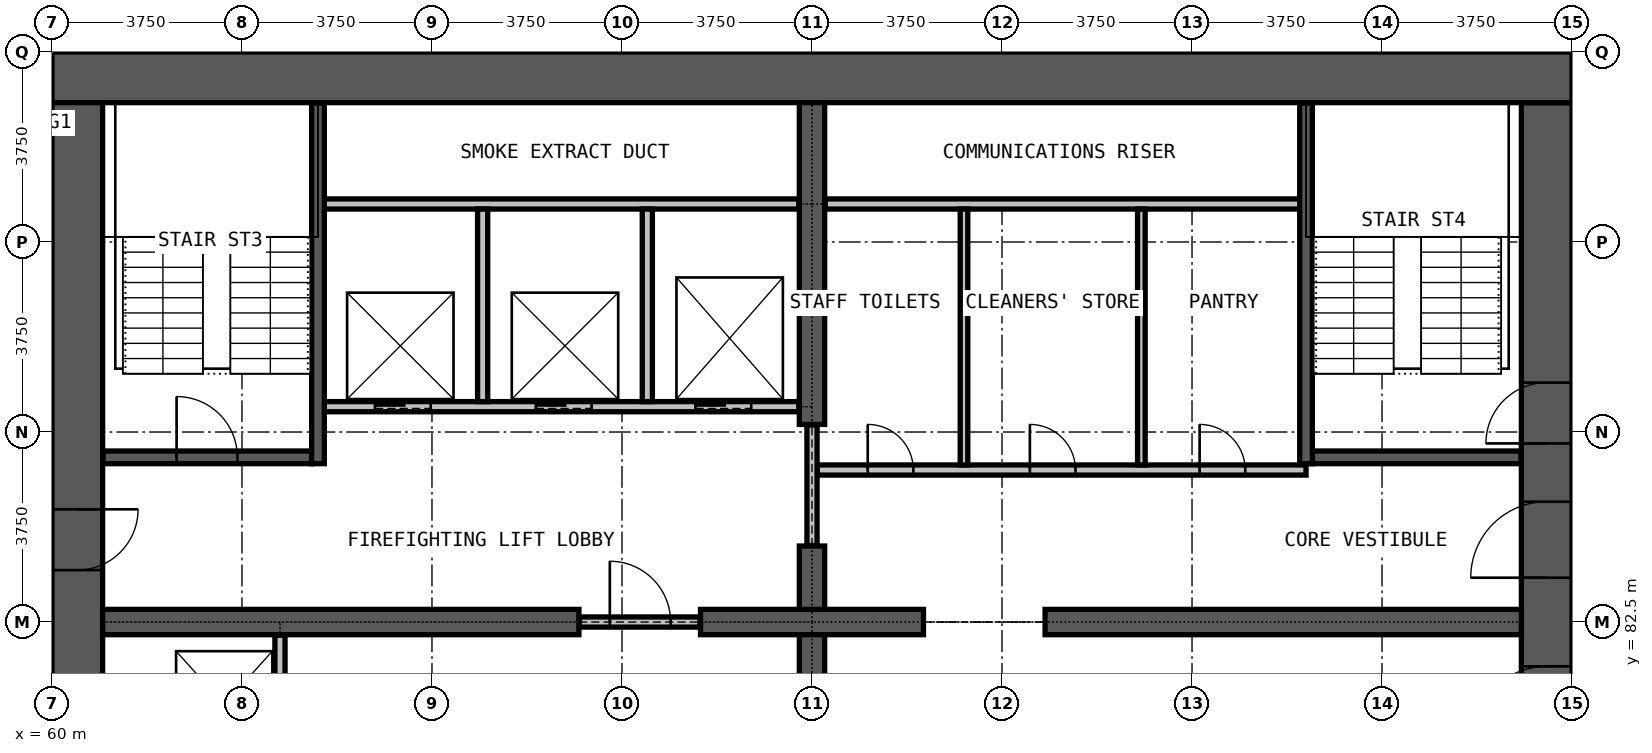
"""IFC4 building model, lengths in metres.
Left out: names, types, materials, properties, quantities, classifications, styles, units other than length and angle.
Written with IfcOpenShell. Run it as: python <this file> out.ifc"""

import sys

from ifc_helpers import new_model, si_unit, direction, frame, frame_2d, origin, place, context, subcontext, project, spatial, rectangle, extrude, element, fill, save


model = new_model("IFC4")
c1 = context("Model", 3, precision=1e-05, world=origin(), true_north=direction((0.0, 1.0)))
c2 = subcontext(c1, "Body", "Model", "MODEL_VIEW")
j1 = project(units=[si_unit("LENGTHUNIT", "METRE"), si_unit("PLANEANGLEUNIT", "RADIAN")], contexts=[c1])
p1 = place(None, origin())
s1 = spatial("IfcSite", under=j1, at=p1, CompositionType="ELEMENT")
p2 = place(p1, origin())
s2 = spatial("IfcBuilding", under=s1, at=p2, CompositionType="ELEMENT")
p3 = place(p2, frame((0.0, 0.0, 56.0)))
s3 = spatial("IfcBuildingStorey", under=s2, at=p3, CompositionType="ELEMENT", Elevation=56.0)
p4 = place(p3, frame((89.5, 72.25, 0.0), z_axis=(0.0, 0.0, 1.0), x_axis=(0.0, 1.0, 0.0)))
e1 = element("IfcWall", 1, at=p4, inside=s3, PredefinedType="SHEAR", context=c2, shape_type="SweptSolid", body=[
    extrude(rectangle(XDim=20.5, YDim=1.0, at=frame_2d((10.25, 0.0))), origin(), (0.0, 0.0, 1.0), 3.3),
])
p5 = place(p4, frame((0.275, 0.0, 0.0)))
e2 = element("IfcOpeningElement", 2, at=p5, cuts=e1, PredefinedType="OPENING", context=c2, shape_type="SweptSolid", body=[
    extrude(rectangle(XDim=1.2, YDim=2.2, at=frame_2d((0.6, 1.1))), frame((0.0, 0.51, 0.0), z_axis=(0.0, -1.0, 0.0), x_axis=(1.0, 0.0, 0.0)), (0.0, 0.0, 1.0), 1.02),
])
p6 = place(p4, frame((13.775, 0.0, 0.0)))
e3 = element("IfcOpeningElement", 3, at=p6, cuts=e1, PredefinedType="OPENING", context=c2, shape_type="SweptSolid", body=[
    extrude(rectangle(XDim=1.2, YDim=2.2, at=frame_2d((0.6, 1.1))), frame((0.0, 0.51, 0.0), z_axis=(0.0, -1.0, 0.0), x_axis=(1.0, 0.0, 0.0)), (0.0, 0.0, 1.0), 1.02),
])
p7 = place(p4, frame((7.875, 0.0, 0.0)))
e4 = element("IfcOpeningElement", 4, at=p7, cuts=e1, PredefinedType="OPENING", context=c2, shape_type="SweptSolid", body=[
    extrude(rectangle(XDim=1.5, YDim=2.2, at=frame_2d((0.75, 1.1))), frame((0.0, 0.51, 0.0), z_axis=(0.0, -1.0, 0.0), x_axis=(1.0, 0.0, 0.0)), (0.0, 0.0, 1.0), 1.02),
])
p8 = place(p4, frame((11.125, 0.0, 0.0)))
e5 = element("IfcOpeningElement", 5, at=p8, cuts=e1, PredefinedType="OPENING", context=c2, shape_type="SweptSolid", body=[
    extrude(rectangle(XDim=1.5, YDim=2.2, at=frame_2d((0.75, 1.1))), frame((0.0, 0.51, 0.0), z_axis=(0.0, -1.0, 0.0), x_axis=(1.0, 0.0, 0.0)), (0.0, 0.0, 1.0), 1.02),
])
p9 = place(p3, frame((90.0, 93.25, 0.0), z_axis=(0.0, 0.0, 1.0), x_axis=(-1.0, 0.0, 0.0)))
e6 = element("IfcWall", 6, at=p9, inside=s3, PredefinedType="SHEAR", context=c2, shape_type="SweptSolid", body=[
    extrude(rectangle(XDim=30.0, YDim=1.0, at=frame_2d((15.0, 0.0))), origin(), (0.0, 0.0, 1.0), 3.3),
])
p10 = place(p3, frame((60.5, 92.75, 0.0), z_axis=(0.0, 0.0, 1.0), x_axis=(0.0, -1.0, 0.0)))
e7 = element("IfcWall", 7, at=p10, inside=s3, PredefinedType="SHEAR", context=c2, shape_type="SweptSolid", body=[
    extrude(rectangle(XDim=20.5, YDim=1.0, at=frame_2d((10.25, 0.0))), origin(), (0.0, 0.0, 1.0), 3.3),
])
p11 = place(p10, frame((19.025, 0.0, 0.0)))
e8 = element("IfcOpeningElement", 8, at=p11, cuts=e7, PredefinedType="OPENING", context=c2, shape_type="SweptSolid", body=[
    extrude(rectangle(XDim=1.2, YDim=2.2, at=frame_2d((0.6, 1.1))), frame((0.0, 0.51, 0.0), z_axis=(0.0, -1.0, 0.0), x_axis=(1.0, 0.0, 0.0)), (0.0, 0.0, 1.0), 1.02),
])
p12 = place(p10, frame((8.025, 0.0, 0.0)))
e9 = element("IfcOpeningElement", 9, at=p12, cuts=e7, PredefinedType="OPENING", context=c2, shape_type="SweptSolid", body=[
    extrude(rectangle(XDim=1.2, YDim=2.2, at=frame_2d((0.6, 1.1))), frame((0.0, 0.51, 0.0), z_axis=(0.0, -1.0, 0.0), x_axis=(1.0, 0.0, 0.0)), (0.0, 0.0, 1.0), 1.02),
])
p13 = place(p3, frame((61.0, 82.5, 0.0), z_axis=(0.0, 0.0, 1.0), x_axis=(1.0, 0.0, 0.0)))
e10 = element("IfcWall", 10, at=p13, inside=s3, PredefinedType="SHEAR", context=c2, shape_type="SweptSolid", body=[
    extrude(rectangle(XDim=9.4, YDim=0.5, at=frame_2d((4.7, 0.0))), origin(), (0.0, 0.0, 1.0), 3.3),
])
p14 = place(p3, frame((72.8, 82.5, 0.0), z_axis=(0.0, 0.0, 1.0), x_axis=(1.0, 0.0, 0.0)))
e11 = element("IfcWall", 11, at=p14, inside=s3, PredefinedType="SHEAR", context=c2, shape_type="SweptSolid", body=[
    extrude(rectangle(XDim=4.4, YDim=0.5, at=frame_2d((2.2, 0.0))), origin(), (0.0, 0.0, 1.0), 3.3),
])
p15 = place(p3, frame((79.6, 82.5, 0.0), z_axis=(0.0, 0.0, 1.0), x_axis=(1.0, 0.0, 0.0)))
e12 = element("IfcWall", 12, at=p15, inside=s3, PredefinedType="SHEAR", context=c2, shape_type="SweptSolid", body=[
    extrude(rectangle(XDim=9.4, YDim=0.5, at=frame_2d((4.7, 0.0))), origin(), (0.0, 0.0, 1.0), 3.3),
])
for number, where, z_axis, x_axis in (
    (13, (75.0, 81.0, 0.0), (0.0, 0.0, 1.0), (0.0, 1.0, 0.0)),
    (14, (75.0, 82.75, 0.0), (0.0, 0.0, 1.0), (0.0, 1.0, 0.0)),
):
    element("IfcWall", number, at=place(p3, frame(where, z_axis=z_axis, x_axis=x_axis)), inside=s3, PredefinedType="SHEAR", context=c2, shape_type="SweptSolid", body=[
        extrude(rectangle(XDim=1.25, YDim=0.5, at=frame_2d((0.625, 0.0))), origin(), (0.0, 0.0, 1.0), 3.3),
    ])
p16 = place(p3, frame((75.0, 86.4, 0.0), z_axis=(0.0, 0.0, 1.0), x_axis=(0.0, 1.0, 0.0)))
e15 = element("IfcWall", 15, at=p16, inside=s3, PredefinedType="SHEAR", context=c2, shape_type="SweptSolid", body=[
    extrude(rectangle(XDim=6.35, YDim=0.5, at=frame_2d((3.175, 0.0))), origin(), (0.0, 0.0, 1.0), 3.3),
])
p17 = place(p3, frame((70.41, 82.5, 0.0), z_axis=(0.0, 0.0, 1.0), x_axis=(1.0, 0.0, 0.0)))
e16 = element("IfcWall", 16, at=p17, inside=s3, PredefinedType="PARTITIONING", context=c2, shape_type="SweptSolid", body=[
    extrude(rectangle(XDim=2.38, YDim=0.2, at=frame_2d((1.19, 0.0))), origin(), (0.0, 0.0, 1.0), 2.4),
])
p18 = place(p17, frame((0.6, 0.0, 0.0)))
e17 = element("IfcOpeningElement", 17, at=p18, cuts=e16, PredefinedType="OPENING", context=c2, shape_type="SweptSolid", body=[
    extrude(rectangle(XDim=1.2, YDim=2.2, at=frame_2d((0.6, 1.1))), frame((0.0, 0.11, 0.0), z_axis=(0.0, -1.0, 0.0), x_axis=(1.0, 0.0, 0.0)), (0.0, 0.0, 1.0), 0.22),
])
p19 = place(p3, frame((75.1, 85.5, 0.0), z_axis=(0.0, 0.0, 1.0), x_axis=(1.0, 0.0, 0.0)))
e18 = element("IfcWall", 18, at=p19, inside=s3, PredefinedType="PARTITIONING", context=c2, shape_type="SweptSolid", body=[
    extrude(rectangle(XDim=9.65, YDim=0.2, at=frame_2d((4.825, 0.0))), origin(), (0.0, 0.0, 1.0), 3.0),
])
p20 = place(p19, frame((1.0, 0.0, 0.0)))
e19 = element("IfcOpeningElement", 19, at=p20, cuts=e18, PredefinedType="OPENING", context=c2, shape_type="SweptSolid", body=[
    extrude(rectangle(XDim=0.9, YDim=2.2, at=frame_2d((0.45, 1.1))), frame((0.0, 0.11, 0.0), z_axis=(0.0, -1.0, 0.0), x_axis=(1.0, 0.0, 0.0)), (0.0, 0.0, 1.0), 0.22),
])
p21 = place(p19, frame((4.2, 0.0, 0.0)))
e20 = element("IfcOpeningElement", 20, at=p21, cuts=e18, PredefinedType="OPENING", context=c2, shape_type="SweptSolid", body=[
    extrude(rectangle(XDim=0.9, YDim=2.2, at=frame_2d((0.45, 1.1))), frame((0.0, 0.11, 0.0), z_axis=(0.0, -1.0, 0.0), x_axis=(1.0, 0.0, 0.0)), (0.0, 0.0, 1.0), 0.22),
])
p22 = place(p19, frame((7.55, 0.0, 0.0)))
e21 = element("IfcOpeningElement", 21, at=p22, cuts=e18, PredefinedType="OPENING", context=c2, shape_type="SweptSolid", body=[
    extrude(rectangle(XDim=0.9, YDim=2.2, at=frame_2d((0.45, 1.1))), frame((0.0, 0.11, 0.0), z_axis=(0.0, -1.0, 0.0), x_axis=(1.0, 0.0, 0.0)), (0.0, 0.0, 1.0), 0.22),
])
p23 = place(p3, frame((75.26, 90.75, 0.0), z_axis=(0.0, 0.0, 1.0), x_axis=(1.0, 0.0, 0.0)))
e22 = element("IfcWall", 22, at=p23, inside=s3, PredefinedType="PARTITIONING", context=c2, shape_type="SweptSolid", body=[
    extrude(rectangle(XDim=9.365, YDim=0.2, at=frame_2d((4.683, 0.0))), origin(), (0.0, 0.0, 1.0), 3.0),
])
p24 = place(p3, frame((75.0, 84.01, 0.0), z_axis=(0.0, 0.0, 1.0), x_axis=(0.0, 1.0, 0.0)))
e23 = element("IfcWall", 23, at=p24, inside=s3, PredefinedType="PARTITIONING", context=c2, shape_type="SweptSolid", body=[
    extrude(rectangle(XDim=2.38, YDim=0.2, at=frame_2d((1.19, 0.0))), origin(), (0.0, 0.0, 1.0), 2.4),
])
for number, where, z_axis, x_axis in (
    (24, (78.0, 85.6, 0.0), (0.0, 0.0, 1.0), (0.0, 1.0, 0.0)),
    (25, (81.5, 85.6, 0.0), (0.0, 0.0, 1.0), (0.0, 1.0, 0.0)),
):
    element("IfcWall", number, at=place(p3, frame(where, z_axis=z_axis, x_axis=x_axis)), inside=s3, PredefinedType="PARTITIONING", context=c2, shape_type="SweptSolid", body=[
        extrude(rectangle(XDim=5.05, YDim=0.15, at=frame_2d((2.525, 0.0))), origin(), (0.0, 0.0, 1.0), 3.0),
    ])
p25 = place(p3, frame((65.375, 86.75, 0.0), z_axis=(0.0, 0.0, 1.0), x_axis=(1.0, 0.0, 0.0)))
e26 = element("IfcWall", 26, at=p25, inside=s3, PredefinedType="PARTITIONING", context=c2, shape_type="SweptSolid", body=[
    extrude(rectangle(XDim=9.365, YDim=0.2, at=frame_2d((4.683, 0.0))), origin(), (0.0, 0.0, 1.0), 3.0),
])
p26 = place(p25, frame((1.0, 0.0, 0.0)))
e27 = element("IfcOpeningElement", 27, at=p26, cuts=e26, PredefinedType="OPENING", context=c2, shape_type="SweptSolid", body=[
    extrude(rectangle(XDim=1.1, YDim=2.2, at=frame_2d((0.55, 1.1))), frame((0.0, 0.11, 0.0), z_axis=(0.0, -1.0, 0.0), x_axis=(1.0, 0.0, 0.0)), (0.0, 0.0, 1.0), 0.22),
])
p27 = place(p25, frame((4.175, 0.0, 0.0)))
e28 = element("IfcOpeningElement", 28, at=p27, cuts=e26, PredefinedType="OPENING", context=c2, shape_type="SweptSolid", body=[
    extrude(rectangle(XDim=1.1, YDim=2.2, at=frame_2d((0.55, 1.1))), frame((0.0, 0.11, 0.0), z_axis=(0.0, -1.0, 0.0), x_axis=(1.0, 0.0, 0.0)), (0.0, 0.0, 1.0), 0.22),
])
p28 = place(p25, frame((7.325, 0.0, 0.0)))
e29 = element("IfcOpeningElement", 29, at=p28, cuts=e26, PredefinedType="OPENING", context=c2, shape_type="SweptSolid", body=[
    extrude(rectangle(XDim=1.1, YDim=2.2, at=frame_2d((0.55, 1.1))), frame((0.0, 0.11, 0.0), z_axis=(0.0, -1.0, 0.0), x_axis=(1.0, 0.0, 0.0)), (0.0, 0.0, 1.0), 0.22),
])
p29 = place(p3, frame((65.375, 90.75, 0.0), z_axis=(0.0, 0.0, 1.0), x_axis=(1.0, 0.0, 0.0)))
e30 = element("IfcWall", 30, at=p29, inside=s3, PredefinedType="PARTITIONING", context=c2, shape_type="SweptSolid", body=[
    extrude(rectangle(XDim=9.365, YDim=0.2, at=frame_2d((4.683, 0.0))), origin(), (0.0, 0.0, 1.0), 3.0),
])
p30 = place(p3, frame((64.5, 79.375, 0.0), z_axis=(0.0, 0.0, 1.0), x_axis=(0.0, 1.0, 0.0)))
e31 = element("IfcWall", 31, at=p30, inside=s3, PredefinedType="PARTITIONING", context=c2, shape_type="SweptSolid", body=[
    extrude(rectangle(XDim=2.865, YDim=0.2, at=frame_2d((1.433, 0.0))), origin(), (0.0, 0.0, 1.0), 3.0),
])
for number, where, z_axis, x_axis in (
    (32, (68.5, 86.85, 0.0), (0.0, 0.0, 1.0), (0.0, 1.0, 0.0)),
    (33, (71.75, 86.85, 0.0), (0.0, 0.0, 1.0), (0.0, 1.0, 0.0)),
):
    element("IfcWall", number, at=place(p3, frame(where, z_axis=z_axis, x_axis=x_axis)), inside=s3, PredefinedType="PARTITIONING", context=c2, shape_type="SweptSolid", body=[
        extrude(rectangle(XDim=3.8, YDim=0.2, at=frame_2d((1.9, 0.0))), origin(), (0.0, 0.0, 1.0), 3.0),
    ])
p31 = place(p3, frame((61.01, 85.75, 0.0), z_axis=(0.0, 0.0, 1.0), x_axis=(1.0, 0.0, 0.0)))
e34 = element("IfcWall", 34, at=p31, inside=s3, PredefinedType="PARTITIONING", context=c2, shape_type="SweptSolid", body=[
    extrude(rectangle(XDim=4.115, YDim=0.25, at=frame_2d((2.058, 0.0))), origin(), (0.0, 0.0, 1.0), 3.0),
])
p32 = place(p31, frame((1.45, 0.0, 0.0)))
e35 = element("IfcOpeningElement", 35, at=p32, cuts=e34, PredefinedType="OPENING", context=c2, shape_type="SweptSolid", body=[
    extrude(rectangle(XDim=1.2, YDim=2.2, at=frame_2d((0.6, 1.1))), frame((0.0, 0.135, 0.0), z_axis=(0.0, -1.0, 0.0), x_axis=(1.0, 0.0, 0.0)), (0.0, 0.0, 1.0), 0.27),
])
p33 = place(p3, frame((84.875, 85.75, 0.0), z_axis=(0.0, 0.0, 1.0), x_axis=(1.0, 0.0, 0.0)))
e36 = element("IfcWall", 36, at=p33, inside=s3, PredefinedType="PARTITIONING", context=c2, shape_type="SweptSolid", body=[
    extrude(rectangle(XDim=4.115, YDim=0.25, at=frame_2d((2.058, 0.0))), origin(), (0.0, 0.0, 1.0), 3.0),
])
for number, where, z_axis, x_axis in (
    (37, (65.25, 85.625, 0.0), (0.0, 0.0, 1.0), (0.0, 1.0, 0.0)),
    (38, (84.75, 85.625, 0.0), (0.0, 0.0, 1.0), (0.0, 1.0, 0.0)),
):
    element("IfcWall", number, at=place(p3, frame(where, z_axis=z_axis, x_axis=x_axis)), inside=s3, PredefinedType="PARTITIONING", context=c2, shape_type="SweptSolid", body=[
        extrude(rectangle(XDim=7.115, YDim=0.25, at=frame_2d((3.558, 0.0))), origin(), (0.0, 0.0, 1.0), 3.0),
    ])
p34 = place(p26, origin())
e39 = element("IfcDoor", 39, at=p34, inside=s3, OperationType="DOUBLE_DOOR_SLIDING", PredefinedType="DOOR", context=c2, shape_type="SweptSolid", body=[
    extrude(rectangle(XDim=1.1, YDim=2.2, at=frame_2d((0.55, 1.1))), frame((0.0, 0.025, 0.0), z_axis=(0.0, -1.0, 0.0), x_axis=(1.0, 0.0, 0.0)), (0.0, 0.0, 1.0), 0.05),
])
fill(e27, e39)
p35 = place(p27, origin())
e40 = element("IfcDoor", 40, at=p35, inside=s3, OperationType="DOUBLE_DOOR_SLIDING", PredefinedType="DOOR", context=c2, shape_type="SweptSolid", body=[
    extrude(rectangle(XDim=1.1, YDim=2.2, at=frame_2d((0.55, 1.1))), frame((0.0, 0.025, 0.0), z_axis=(0.0, -1.0, 0.0), x_axis=(1.0, 0.0, 0.0)), (0.0, 0.0, 1.0), 0.05),
])
fill(e28, e40)
p36 = place(p28, origin())
e41 = element("IfcDoor", 41, at=p36, inside=s3, OperationType="DOUBLE_DOOR_SLIDING", PredefinedType="DOOR", context=c2, shape_type="SweptSolid", body=[
    extrude(rectangle(XDim=1.1, YDim=2.2, at=frame_2d((0.55, 1.1))), frame((0.0, 0.025, 0.0), z_axis=(0.0, -1.0, 0.0), x_axis=(1.0, 0.0, 0.0)), (0.0, 0.0, 1.0), 0.05),
])
fill(e29, e41)
p37 = place(p18, origin())
e42 = element("IfcDoor", 42, at=p37, inside=s3, OperationType="SINGLE_SWING_RIGHT", PredefinedType="DOOR", context=c2, shape_type="SweptSolid", body=[
    extrude(rectangle(XDim=1.2, YDim=2.2, at=frame_2d((0.6, 1.1))), frame((0.0, 0.025, 0.0), z_axis=(0.0, -1.0, 0.0), x_axis=(1.0, 0.0, 0.0)), (0.0, 0.0, 1.0), 0.05),
])
fill(e17, e42)
p38 = place(p32, origin())
e43 = element("IfcDoor", 43, at=p38, inside=s3, OperationType="SINGLE_SWING_RIGHT", PredefinedType="DOOR", context=c2, shape_type="SweptSolid", body=[
    extrude(rectangle(XDim=1.2, YDim=2.2, at=frame_2d((0.6, 1.1))), frame((0.0, 0.025, 0.0), z_axis=(0.0, -1.0, 0.0), x_axis=(1.0, 0.0, 0.0)), (0.0, 0.0, 1.0), 0.05),
])
fill(e35, e43)
p39 = place(p6, origin())
e44 = element("IfcDoor", 44, at=p39, inside=s3, OperationType="SINGLE_SWING_LEFT", PredefinedType="DOOR", context=c2, shape_type="SweptSolid", body=[
    extrude(rectangle(XDim=1.2, YDim=2.2, at=frame_2d((0.6, 1.1))), frame((0.0, 0.025, 0.0), z_axis=(0.0, -1.0, 0.0), x_axis=(1.0, 0.0, 0.0)), (0.0, 0.0, 1.0), 0.05),
])
fill(e3, e44)
p40 = place(p7, origin())
e45 = element("IfcDoor", 45, at=p40, inside=s3, OperationType="DOUBLE_DOOR_SINGLE_SWING", PredefinedType="DOOR", context=c2, shape_type="SweptSolid", body=[
    extrude(rectangle(XDim=1.5, YDim=2.2, at=frame_2d((0.75, 1.1))), frame((0.0, 0.025, 0.0), z_axis=(0.0, -1.0, 0.0), x_axis=(1.0, 0.0, 0.0)), (0.0, 0.0, 1.0), 0.05),
])
fill(e4, e45)
p41 = place(p12, origin())
e46 = element("IfcDoor", 46, at=p41, inside=s3, OperationType="SINGLE_SWING_LEFT", PredefinedType="DOOR", context=c2, shape_type="SweptSolid", body=[
    extrude(rectangle(XDim=1.2, YDim=2.2, at=frame_2d((0.6, 1.1))), frame((0.0, 0.025, 0.0), z_axis=(0.0, -1.0, 0.0), x_axis=(1.0, 0.0, 0.0)), (0.0, 0.0, 1.0), 0.05),
])
fill(e9, e46)
p42 = place(p8, origin())
e47 = element("IfcDoor", 47, at=p42, inside=s3, OperationType="DOUBLE_DOOR_SINGLE_SWING", PredefinedType="DOOR", context=c2, shape_type="SweptSolid", body=[
    extrude(rectangle(XDim=1.5, YDim=2.2, at=frame_2d((0.75, 1.1))), frame((0.0, 0.025, 0.0), z_axis=(0.0, -1.0, 0.0), x_axis=(1.0, 0.0, 0.0)), (0.0, 0.0, 1.0), 0.05),
])
fill(e5, e47)
p43 = place(p20, origin())
e48 = element("IfcDoor", 48, at=p43, inside=s3, OperationType="SINGLE_SWING_LEFT", PredefinedType="DOOR", context=c2, shape_type="SweptSolid", body=[
    extrude(rectangle(XDim=0.9, YDim=2.2, at=frame_2d((0.45, 1.1))), frame((0.0, 0.025, 0.0), z_axis=(0.0, -1.0, 0.0), x_axis=(1.0, 0.0, 0.0)), (0.0, 0.0, 1.0), 0.05),
])
fill(e19, e48)
p44 = place(p21, origin())
e49 = element("IfcDoor", 49, at=p44, inside=s3, OperationType="SINGLE_SWING_LEFT", PredefinedType="DOOR", context=c2, shape_type="SweptSolid", body=[
    extrude(rectangle(XDim=0.9, YDim=2.2, at=frame_2d((0.45, 1.1))), frame((0.0, 0.025, 0.0), z_axis=(0.0, -1.0, 0.0), x_axis=(1.0, 0.0, 0.0)), (0.0, 0.0, 1.0), 0.05),
])
fill(e20, e49)
p45 = place(p22, origin())
e50 = element("IfcDoor", 50, at=p45, inside=s3, OperationType="SINGLE_SWING_RIGHT", PredefinedType="DOOR", context=c2, shape_type="SweptSolid", body=[
    extrude(rectangle(XDim=0.9, YDim=2.2, at=frame_2d((0.45, 1.1))), frame((0.0, 0.025, 0.0), z_axis=(0.0, -1.0, 0.0), x_axis=(1.0, 0.0, 0.0)), (0.0, 0.0, 1.0), 0.05),
])
fill(e21, e50)
save(model, sys.argv[1])
